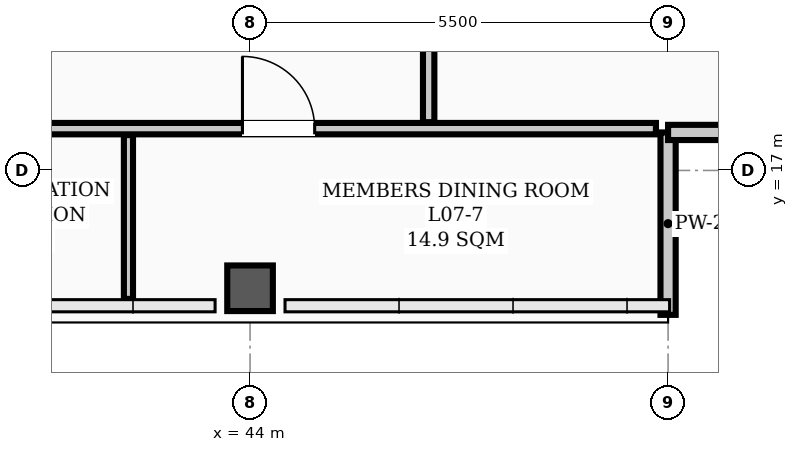
"""IFC4 building model, lengths in metres.
Left out: names, types, materials, properties, quantities, classifications, styles, units other than length and angle.
Written with IfcOpenShell. Run it as: python <this file> out.ifc"""

import sys

from ifc_helpers import new_model, si_unit, direction, frame, frame_2d, origin, origin_2d, place, context, subcontext, project, spatial, rectangle, hollow_rectangle, extrude, element, fill, save


model = new_model("IFC4")
c1 = context("Model", 3, precision=1e-05, world=origin(), true_north=direction((0.0, 1.0)))
c2 = subcontext(c1, "Body", "Model", "MODEL_VIEW")
j1 = project(units=[si_unit("LENGTHUNIT", "METRE"), si_unit("PLANEANGLEUNIT", "RADIAN")], contexts=[c1])
p1 = place(None, origin())
s1 = spatial("IfcSite", under=j1, at=p1, CompositionType="ELEMENT")
p2 = place(p1, origin())
s2 = spatial("IfcBuilding", under=s1, at=p2, CompositionType="ELEMENT")
p3 = place(p2, frame((0.0, 0.0, 30.4)))
s3 = spatial("IfcBuildingStorey", under=s2, at=p3, CompositionType="ELEMENT", Elevation=30.4)
p4 = place(p3, frame((44.0, 15.45, 0.0), z_axis=(0.0, 0.0, 1.0), x_axis=(1.0, 0.0, 0.0)))
e1 = element("IfcColumn", 1, at=p4, inside=s3, PredefinedType="COLUMN", context=c2, shape_type="SweptSolid", body=[
    extrude(hollow_rectangle(XDim=0.6, YDim=0.6, WallThickness=0.026, InnerFilletRadius=0.013, OuterFilletRadius=0.039, at=origin_2d()), origin(), (0.0, 0.0, 1.0), 3.9),
])
for number, where, z_axis, x_axis in (
    (2, (49.5, 15.1, 0.0), (0.0, 0.0, 1.0), (0.0, 1.0, 0.0)),
    (3, (49.5, 17.5, 0.0), (0.0, 0.0, 1.0), (1.0, 0.0, 0.0)),
):
    element("IfcWall", number, at=place(p3, frame(where, z_axis=z_axis, x_axis=x_axis)), inside=s3, PredefinedType="PARAPET", context=c2, shape_type="SweptSolid", body=[
        extrude(rectangle(XDim=2.4, YDim=0.2, at=frame_2d((1.2, 0.0))), origin(), (0.0, 0.0, 1.0), 1.2),
    ])
p5 = place(p3, frame((4.66, 17.55, 0.0), z_axis=(0.0, 0.0, 1.0), x_axis=(1.0, 0.0, 0.0)))
e4 = element("IfcWall", 4, at=p5, inside=s3, PredefinedType="PARTITIONING", context=c2, shape_type="SweptSolid", body=[
    extrude(rectangle(XDim=44.68, YDim=0.15, at=frame_2d((22.34, 0.0))), origin(), (0.0, 0.0, 1.0), 3.1),
])
p6 = place(p5, frame((6.74, 0.0, 0.0)))
e5 = element("IfcOpeningElement", 5, at=p6, cuts=e4, PredefinedType="OPENING", context=c2, shape_type="SweptSolid", body=[
    extrude(rectangle(XDim=0.95, YDim=2.08, at=frame_2d((0.475, 1.04))), frame((0.0, 0.085, 0.0), z_axis=(0.0, -1.0, 0.0), x_axis=(1.0, 0.0, 0.0)), (0.0, 0.0, 1.0), 0.17),
])
p7 = place(p5, frame((13.865, 0.0, 0.0)))
e6 = element("IfcOpeningElement", 6, at=p7, cuts=e4, PredefinedType="OPENING", context=c2, shape_type="SweptSolid", body=[
    extrude(rectangle(XDim=0.95, YDim=2.08, at=frame_2d((0.475, 1.04))), frame((0.0, 0.085, 0.0), z_axis=(0.0, -1.0, 0.0), x_axis=(1.0, 0.0, 0.0)), (0.0, 0.0, 1.0), 0.17),
])
p8 = place(p5, frame((28.765, 0.0, 0.0)))
e7 = element("IfcOpeningElement", 7, at=p8, cuts=e4, PredefinedType="OPENING", context=c2, shape_type="SweptSolid", body=[
    extrude(rectangle(XDim=0.95, YDim=2.08, at=frame_2d((0.475, 1.04))), frame((0.0, 0.085, 0.0), z_axis=(0.0, -1.0, 0.0), x_axis=(1.0, 0.0, 0.0)), (0.0, 0.0, 1.0), 0.17),
])
p9 = place(p5, frame((34.465, 0.0, 0.0)))
e8 = element("IfcOpeningElement", 8, at=p9, cuts=e4, PredefinedType="OPENING", context=c2, shape_type="SweptSolid", body=[
    extrude(rectangle(XDim=0.95, YDim=2.08, at=frame_2d((0.475, 1.04))), frame((0.0, 0.085, 0.0), z_axis=(0.0, -1.0, 0.0), x_axis=(1.0, 0.0, 0.0)), (0.0, 0.0, 1.0), 0.17),
])
p10 = place(p5, frame((39.24, 0.0, 0.0)))
e9 = element("IfcOpeningElement", 9, at=p10, cuts=e4, PredefinedType="OPENING", context=c2, shape_type="SweptSolid", body=[
    extrude(rectangle(XDim=0.95, YDim=2.08, at=frame_2d((0.475, 1.04))), frame((0.0, 0.085, 0.0), z_axis=(0.0, -1.0, 0.0), x_axis=(1.0, 0.0, 0.0)), (0.0, 0.0, 1.0), 0.17),
])
p11 = place(p3, frame((46.35, 17.635, 0.0), z_axis=(0.0, 0.0, 1.0), x_axis=(0.0, 1.0, 0.0)))
e10 = element("IfcWall", 10, at=p11, inside=s3, PredefinedType="PARTITIONING", context=c2, shape_type="SweptSolid", body=[
    extrude(rectangle(XDim=22.53, YDim=0.15, at=frame_2d((11.265, 0.0))), origin(), (0.0, 0.0, 1.0), 3.0),
])
p12 = place(p11, frame((3.165, 0.0, 0.0)))
e11 = element("IfcOpeningElement", 11, at=p12, cuts=e10, PredefinedType="OPENING", context=c2, shape_type="SweptSolid", body=[
    extrude(rectangle(XDim=0.95, YDim=2.08, at=frame_2d((0.475, 1.04))), frame((0.0, 0.085, 0.0), z_axis=(0.0, -1.0, 0.0), x_axis=(1.0, 0.0, 0.0)), (0.0, 0.0, 1.0), 0.17),
])
p13 = place(p11, frame((8.09, 0.0, 0.0)))
e12 = element("IfcOpeningElement", 12, at=p13, cuts=e10, PredefinedType="OPENING", context=c2, shape_type="SweptSolid", body=[
    extrude(rectangle(XDim=0.95, YDim=2.08, at=frame_2d((0.475, 1.04))), frame((0.0, 0.085, 0.0), z_axis=(0.0, -1.0, 0.0), x_axis=(1.0, 0.0, 0.0)), (0.0, 0.0, 1.0), 0.17),
])
p14 = place(p11, frame((15.39, 0.0, 0.0)))
e13 = element("IfcOpeningElement", 13, at=p14, cuts=e10, PredefinedType="OPENING", context=c2, shape_type="SweptSolid", body=[
    extrude(rectangle(XDim=0.95, YDim=2.08, at=frame_2d((0.475, 1.04))), frame((0.0, 0.085, 0.0), z_axis=(0.0, -1.0, 0.0), x_axis=(1.0, 0.0, 0.0)), (0.0, 0.0, 1.0), 0.17),
])
p15 = place(p11, frame((20.015, 0.0, 0.0)))
e14 = element("IfcOpeningElement", 14, at=p15, cuts=e10, PredefinedType="OPENING", context=c2, shape_type="SweptSolid", body=[
    extrude(rectangle(XDim=0.95, YDim=2.08, at=frame_2d((0.475, 1.04))), frame((0.0, 0.085, 0.0), z_axis=(0.0, -1.0, 0.0), x_axis=(1.0, 0.0, 0.0)), (0.0, 0.0, 1.0), 0.17),
])
p16 = place(p3, frame((42.4, 15.31, 0.0), z_axis=(0.0, 0.0, 1.0), x_axis=(0.0, 1.0, 0.0)))
e15 = element("IfcWall", 15, at=p16, inside=s3, PredefinedType="PARTITIONING", context=c2, shape_type="SweptSolid", body=[
    extrude(rectangle(XDim=2.155, YDim=0.12, at=frame_2d((1.078, 0.0))), origin(), (0.0, 0.0, 1.0), 3.212),
])
p17 = place(p10, origin())
e16 = element("IfcDoor", 16, at=p17, inside=s3, OperationType="SINGLE_SWING_LEFT", PredefinedType="DOOR", context=c2, shape_type="SweptSolid", body=[
    extrude(rectangle(XDim=0.95, YDim=2.08, at=frame_2d((0.475, 1.04))), frame((0.0, 0.025, 0.0), z_axis=(0.0, -1.0, 0.0), x_axis=(1.0, 0.0, 0.0)), (0.0, 0.0, 1.0), 0.05),
])
fill(e9, e16)
save(model, sys.argv[1])
